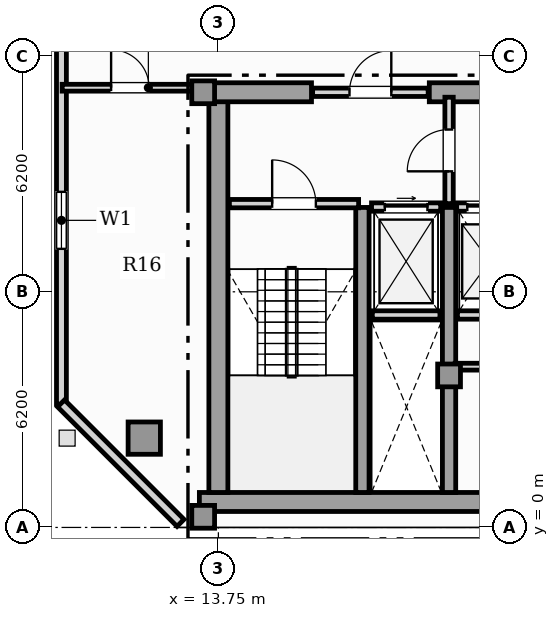
"""IFC4 building model, lengths in metres.
Left out: names, types, materials, properties, quantities, classifications, styles, units other than length and angle.
Written with IfcOpenShell. Run it as: python <this file> out.ifc"""

import sys

from ifc_helpers import new_model, si_unit, direction, frame, frame_2d, origin, origin_2d, place, context, subcontext, project, spatial, rectangle, hollow_rectangle, extrude, element, fill, save


model = new_model("IFC4")
c1 = context("Model", 3, precision=1e-05, world=origin(), true_north=direction((0.0, 1.0)))
c2 = subcontext(c1, "Body", "Model", "MODEL_VIEW")
j1 = project(units=[si_unit("LENGTHUNIT", "METRE"), si_unit("PLANEANGLEUNIT", "RADIAN")], contexts=[c1])
p1 = place(None, origin())
s1 = spatial("IfcSite", under=j1, at=p1, CompositionType="ELEMENT")
p2 = place(p1, origin())
s2 = spatial("IfcBuilding", under=s1, at=p2, CompositionType="ELEMENT")
p3 = place(p2, frame((0.0, 0.0, 345.2)))
s3 = spatial("IfcBuildingStorey", under=s2, at=p3, CompositionType="ELEMENT", Elevation=345.2)
p4 = place(p3, frame((13.25, 0.67, 0.0), z_axis=(0.0, 0.0, 1.0), x_axis=(1.0, 0.0, 0.0)))
e1 = element("IfcWall", 1, at=p4, inside=s3, PredefinedType="SHEAR", context=c2, shape_type="SweptSolid", body=[
    extrude(rectangle(XDim=31.0, YDim=0.5, at=frame_2d((15.5, 0.0))), origin(), (0.0, 0.0, 1.0), 3.59),
])
p5 = place(p3, frame((13.75, 0.92, 0.0), z_axis=(0.0, 0.0, 1.0), x_axis=(0.0, 1.0, 0.0)))
e2 = element("IfcWall", 2, at=p5, inside=s3, PredefinedType="SHEAR", context=c2, shape_type="SweptSolid", body=[
    extrude(rectangle(XDim=10.53, YDim=0.5, at=frame_2d((5.265, 0.0))), origin(), (0.0, 0.0, 1.0), 3.59),
])
p6 = place(p3, frame((13.25, 11.45, 0.0), z_axis=(0.0, 0.0, 1.0), x_axis=(1.0, 0.0, 0.0)))
e3 = element("IfcWall", 3, at=p6, inside=s3, PredefinedType="SHEAR", context=c2, shape_type="SweptSolid", body=[
    extrude(rectangle(XDim=2.95, YDim=0.5, at=frame_2d((1.475, 0.0))), origin(), (0.0, 0.0, 1.0), 3.59),
])
p7 = place(p3, frame((19.3, 11.45, 0.0), z_axis=(0.0, 0.0, 1.0), x_axis=(1.0, 0.0, 0.0)))
e4 = element("IfcWall", 4, at=p7, inside=s3, PredefinedType="SHEAR", context=c2, shape_type="SweptSolid", body=[
    extrude(rectangle(XDim=7.3, YDim=0.5, at=frame_2d((3.65, 0.0))), origin(), (0.0, 0.0, 1.0), 3.59),
])
for number, where, z_axis, x_axis in (
    (5, (17.54, 0.92, 0.0), (0.0, 0.0, 1.0), (0.0, 1.0, 0.0)),
    (6, (19.82, 0.92, 0.0), (0.0, 0.0, 1.0), (0.0, 1.0, 0.0)),
):
    element("IfcWall", number, at=place(p3, frame(where, z_axis=z_axis, x_axis=x_axis)), inside=s3, PredefinedType="SHEAR", context=c2, shape_type="SweptSolid", body=[
        extrude(rectangle(XDim=7.5, YDim=0.35, at=frame_2d((3.75, 0.0))), origin(), (0.0, 0.0, 1.0), 3.59),
    ])
for number, where, z_axis, x_axis in (
    (7, (13.35, 0.28, 0.0), (0.0, 0.0, 1.0), (1.0, 0.0, 0.0)),
    (8, (13.35, 11.45, 0.0), (0.0, 0.0, 1.0), (1.0, 0.0, 0.0)),
    (9, (19.82, 4.0, 0.0), (0.0, 0.0, 1.0), (1.0, 0.0, 0.0)),
):
    element("IfcColumn", number, at=place(p3, frame(where, z_axis=z_axis, x_axis=x_axis)), inside=s3, PredefinedType="COLUMN", context=c2, shape_type="SweptSolid", body=[
        extrude(rectangle(XDim=0.6, YDim=0.6, at=origin_2d()), origin(), (0.0, 0.0, 1.0), 3.85),
    ])
p8 = place(p3, frame((11.8, 2.35, 0.0), z_axis=(0.0, 0.0, 1.0), x_axis=(1.0, 0.0, 0.0)))
e10 = element("IfcColumn", 10, at=p8, inside=s3, PredefinedType="USERDEFINED", context=c2, shape_type="SweptSolid", body=[
    extrude(hollow_rectangle(XDim=0.85, YDim=0.85, WallThickness=0.05, at=origin_2d()), origin(), (0.0, 0.0, 1.0), 3.85),
])
p9 = place(p3, frame((9.621, 28.202, 0.0), z_axis=(0.0, 0.0, 1.0), x_axis=(0.0, -1.0, 0.0)))
e11 = element("IfcWall", 11, at=p9, inside=s3, PredefinedType="SOLIDWALL", context=c2, shape_type="SweptSolid", body=[
    extrude(rectangle(XDim=24.962, YDim=0.26, at=frame_2d((12.481, 0.0))), origin(), (0.0, 0.0, 1.0), 3.59),
])
p10 = place(p9, frame((19.372, 0.0, 0.9)))
e12 = element("IfcOpeningElement", 12, at=p10, cuts=e11, PredefinedType="OPENING", context=c2, shape_type="SweptSolid", body=[
    extrude(rectangle(XDim=1.5, YDim=1.95, at=frame_2d((0.75, 0.975))), frame((0.0, 0.14, 0.0), z_axis=(0.0, -1.0, 0.0), x_axis=(1.0, 0.0, 0.0)), (0.0, 0.0, 1.0), 0.28),
])
p11 = place(p9, frame((2.77, 0.0, 0.95)))
e13 = element("IfcOpeningElement", 13, at=p11, cuts=e11, PredefinedType="OPENING", context=c2, shape_type="SweptSolid", body=[
    extrude(rectangle(XDim=0.9, YDim=1.5, at=frame_2d((0.45, 0.75))), frame((0.0, 0.14, 0.0), z_axis=(0.0, -1.0, 0.0), x_axis=(1.0, 0.0, 0.0)), (0.0, 0.0, 1.0), 0.28),
])
p12 = place(p9, frame((7.989, 0.0, 0.9)))
e14 = element("IfcOpeningElement", 14, at=p12, cuts=e11, PredefinedType="OPENING", context=c2, shape_type="SweptSolid", body=[
    extrude(rectangle(XDim=1.5, YDim=1.95, at=frame_2d((0.75, 0.975))), frame((0.0, 0.14, 0.0), z_axis=(0.0, -1.0, 0.0), x_axis=(1.0, 0.0, 0.0)), (0.0, 0.0, 1.0), 0.28),
])
p13 = place(p3, frame((9.611, 3.264, 0.0), z_axis=(0.0, 0.0, 1.0), x_axis=(0.707079321262, -0.707134240044, 0.0)))
e15 = element("IfcWall", 15, at=p13, inside=s3, PredefinedType="SOLIDWALL", context=c2, shape_type="SweptSolid", body=[
    extrude(rectangle(XDim=4.446, YDim=0.26, at=frame_2d((2.223, 0.0))), origin(), (0.0, 0.0, 1.0), 3.59),
])
p14 = place(p3, frame((17.8, 5.59, 0.0), z_axis=(0.0, 0.0, 1.0), x_axis=(1.0, 0.0, 0.0)))
e16 = element("IfcWall", 16, at=p14, inside=s3, PredefinedType="SOLIDWALL", context=c2, shape_type="SweptSolid", body=[
    extrude(rectangle(XDim=1.78, YDim=0.22, at=frame_2d((0.89, 0.0))), origin(), (0.0, 0.0, 1.0), 3.59),
])
p15 = place(p3, frame((17.78, 8.43, 0.0), z_axis=(0.0, 0.0, 1.0), x_axis=(1.0, 0.0, 0.0)))
e17 = element("IfcWall", 17, at=p15, inside=s3, PredefinedType="SOLIDWALL", context=c2, shape_type="SweptSolid", body=[
    extrude(rectangle(XDim=1.82, YDim=0.22, at=frame_2d((0.91, 0.0))), origin(), (0.0, 0.0, 1.0), 3.59),
])
p16 = place(p15, frame((0.35, 0.0, 0.0)))
e18 = element("IfcOpeningElement", 18, at=p16, cuts=e17, PredefinedType="OPENING", context=c2, shape_type="SweptSolid", body=[
    extrude(rectangle(XDim=1.12, YDim=2.25, at=frame_2d((0.56, 1.125))), frame((0.0, 0.12, 0.0), z_axis=(0.0, -1.0, 0.0), x_axis=(1.0, 0.0, 0.0)), (0.0, 0.0, 1.0), 0.24),
])
p17 = place(p3, frame((20.04, 5.59, 0.0), z_axis=(0.0, 0.0, 1.0), x_axis=(1.0, 0.0, 0.0)))
e19 = element("IfcWall", 19, at=p17, inside=s3, PredefinedType="SOLIDWALL", context=c2, shape_type="SweptSolid", body=[
    extrude(rectangle(XDim=1.7, YDim=0.22, at=frame_2d((0.85, 0.0))), origin(), (0.0, 0.0, 1.0), 3.59),
])
p18 = place(p3, frame((20.02, 8.43, 0.0), z_axis=(0.0, 0.0, 1.0), x_axis=(1.0, 0.0, 0.0)))
e20 = element("IfcWall", 20, at=p18, inside=s3, PredefinedType="SOLIDWALL", context=c2, shape_type="SweptSolid", body=[
    extrude(rectangle(XDim=1.74, YDim=0.22, at=frame_2d((0.87, 0.0))), origin(), (0.0, 0.0, 1.0), 3.59),
])
p19 = place(p18, frame((0.28, 0.0, 0.0)))
e21 = element("IfcOpeningElement", 21, at=p19, cuts=e20, PredefinedType="OPENING", context=c2, shape_type="SweptSolid", body=[
    extrude(rectangle(XDim=1.18, YDim=2.2, at=frame_2d((0.59, 1.1))), frame((0.0, 0.12, 0.0), z_axis=(0.0, -1.0, 0.0), x_axis=(1.0, 0.0, 0.0)), (0.0, 0.0, 1.0), 0.24),
])
p20 = place(p3, frame((14.04, 8.52, 0.0), z_axis=(0.0, 0.0, 1.0), x_axis=(1.0, 0.0, 0.0)))
e22 = element("IfcWall", 22, at=p20, inside=s3, PredefinedType="SOLIDWALL", context=c2, shape_type="SweptSolid", body=[
    extrude(rectangle(XDim=3.4, YDim=0.22, at=frame_2d((1.7, 0.0))), origin(), (0.0, 0.0, 1.0), 3.59),
])
p21 = place(p20, frame((1.125, 0.0, 0.0)))
e23 = element("IfcOpeningElement", 23, at=p21, cuts=e22, PredefinedType="OPENING", context=c2, shape_type="SweptSolid", body=[
    extrude(rectangle(XDim=1.15, YDim=2.2, at=frame_2d((0.575, 1.1))), frame((0.0, 0.12, 0.0), z_axis=(0.0, -1.0, 0.0), x_axis=(1.0, 0.0, 0.0)), (0.0, 0.0, 1.0), 0.24),
])
p22 = place(p3, frame((19.82, 8.52, 0.0), z_axis=(0.0, 0.0, 1.0), x_axis=(0.0, 1.0, 0.0)))
e24 = element("IfcWall", 24, at=p22, inside=s3, PredefinedType="SOLIDWALL", context=c2, shape_type="SweptSolid", body=[
    extrude(rectangle(XDim=2.8, YDim=0.22, at=frame_2d((1.4, 0.0))), origin(), (0.0, 0.0, 1.0), 3.046),
])
p23 = place(p22, frame((0.85, 0.0, 0.0)))
e25 = element("IfcOpeningElement", 25, at=p23, cuts=e24, PredefinedType="OPENING", context=c2, shape_type="SweptSolid", body=[
    extrude(rectangle(XDim=1.1, YDim=2.2, at=frame_2d((0.55, 1.1))), frame((0.0, 0.12, 0.0), z_axis=(0.0, -1.0, 0.0), x_axis=(1.0, 0.0, 0.0)), (0.0, 0.0, 1.0), 0.24),
])
p24 = place(p3, frame((16.23, 11.45, 0.0), z_axis=(0.0, 0.0, 1.0), x_axis=(1.0, 0.0, 0.0)))
e26 = element("IfcWall", 26, at=p24, inside=s3, PredefinedType="SOLIDWALL", context=c2, shape_type="SweptSolid", body=[
    extrude(rectangle(XDim=3.04, YDim=0.22, at=frame_2d((1.52, 0.0))), origin(), (0.0, 0.0, 1.0), 3.59),
])
p25 = place(p24, frame((0.97, 0.0, 0.0)))
e27 = element("IfcOpeningElement", 27, at=p25, cuts=e26, PredefinedType="OPENING", context=c2, shape_type="SweptSolid", body=[
    extrude(rectangle(XDim=1.1, YDim=2.2, at=frame_2d((0.55, 1.1))), frame((0.0, 0.12, 0.0), z_axis=(0.0, -1.0, 0.0), x_axis=(1.0, 0.0, 0.0)), (0.0, 0.0, 1.0), 0.24),
])
p26 = place(p3, frame((19.98, 4.23, 0.0), z_axis=(0.0, 0.0, 1.0), x_axis=(1.0, 0.0, 0.0)))
e28 = element("IfcWall", 28, at=p26, inside=s3, PredefinedType="PARTITIONING", context=c2, shape_type="SweptSolid", body=[
    extrude(rectangle(XDim=5.32, YDim=0.18, at=frame_2d((2.66, 0.0))), origin(), (0.0, 0.0, 1.0), 3.59),
])
p27 = place(p3, frame((9.64, 11.57, 0.0), z_axis=(0.0, 0.0, 1.0), x_axis=(1.0, 0.0, 0.0)))
e29 = element("IfcWall", 29, at=p27, inside=s3, PredefinedType="PARTITIONING", context=c2, shape_type="SweptSolid", body=[
    extrude(rectangle(XDim=3.575, YDim=0.18, at=frame_2d((1.788, 0.0))), origin(), (0.0, 0.0, 1.0), 3.59),
])
p28 = place(p27, frame((1.287, 0.0, 0.0)))
e30 = element("IfcOpeningElement", 30, at=p28, cuts=e29, PredefinedType="OPENING", context=c2, shape_type="SweptSolid", body=[
    extrude(rectangle(XDim=1.0, YDim=2.15, at=frame_2d((0.5, 1.075))), frame((0.0, 0.1, 0.0), z_axis=(0.0, -1.0, 0.0), x_axis=(1.0, 0.0, 0.0)), (0.0, 0.0, 1.0), 0.2),
])
p29 = place(p10, origin())
e31 = element("IfcWindow", 31, at=p29, inside=s3, PartitioningType="SINGLE_PANEL", PredefinedType="WINDOW", context=c2, shape_type="SweptSolid", body=[
    extrude(rectangle(XDim=1.5, YDim=1.95, at=frame_2d((0.75, 0.975))), frame((0.0, 0.03, 0.0), z_axis=(0.0, -1.0, 0.0), x_axis=(1.0, 0.0, 0.0)), (0.0, 0.0, 1.0), 0.06),
])
fill(e12, e31)
p30 = place(p16, origin())
e32 = element("IfcDoor", 32, at=p30, inside=s3, OperationType="SLIDING_TO_RIGHT", PredefinedType="DOOR", context=c2, shape_type="SweptSolid", body=[
    extrude(rectangle(XDim=1.12, YDim=2.25, at=frame_2d((0.56, 1.125))), frame((0.0, 0.025, 0.0), z_axis=(0.0, -1.0, 0.0), x_axis=(1.0, 0.0, 0.0)), (0.0, 0.0, 1.0), 0.05),
])
fill(e18, e32)
p31 = place(p19, origin())
e33 = element("IfcDoor", 33, at=p31, inside=s3, OperationType="SLIDING_TO_LEFT", PredefinedType="DOOR", context=c2, shape_type="SweptSolid", body=[
    extrude(rectangle(XDim=1.18, YDim=2.2, at=frame_2d((0.59, 1.1))), frame((0.0, 0.025, 0.0), z_axis=(0.0, -1.0, 0.0), x_axis=(1.0, 0.0, 0.0)), (0.0, 0.0, 1.0), 0.05),
])
fill(e21, e33)
p32 = place(p21, origin())
e34 = element("IfcDoor", 34, at=p32, inside=s3, OperationType="SINGLE_SWING_LEFT", PredefinedType="DOOR", context=c2, shape_type="SweptSolid", body=[
    extrude(rectangle(XDim=1.15, YDim=2.2, at=frame_2d((0.575, 1.1))), frame((0.0, 0.025, 0.0), z_axis=(0.0, -1.0, 0.0), x_axis=(1.0, 0.0, 0.0)), (0.0, 0.0, 1.0), 0.05),
])
fill(e23, e34)
p33 = place(p23, origin())
e35 = element("IfcDoor", 35, at=p33, inside=s3, OperationType="SINGLE_SWING_LEFT", PredefinedType="DOOR", context=c2, shape_type="SweptSolid", body=[
    extrude(rectangle(XDim=1.1, YDim=2.2, at=frame_2d((0.55, 1.1))), frame((0.0, 0.025, 0.0), z_axis=(0.0, -1.0, 0.0), x_axis=(1.0, 0.0, 0.0)), (0.0, 0.0, 1.0), 0.05),
])
fill(e25, e35)
p34 = place(p25, origin())
e36 = element("IfcDoor", 36, at=p34, inside=s3, OperationType="SINGLE_SWING_RIGHT", PredefinedType="DOOR", context=c2, shape_type="SweptSolid", body=[
    extrude(rectangle(XDim=1.1, YDim=2.2, at=frame_2d((0.55, 1.1))), frame((0.0, 0.025, 0.0), z_axis=(0.0, -1.0, 0.0), x_axis=(1.0, 0.0, 0.0)), (0.0, 0.0, 1.0), 0.05),
])
fill(e27, e36)
p35 = place(p28, origin())
e37 = element("IfcDoor", 37, at=p35, inside=s3, OperationType="SINGLE_SWING_LEFT", PredefinedType="DOOR", context=c2, shape_type="SweptSolid", body=[
    extrude(rectangle(XDim=1.0, YDim=2.15, at=frame_2d((0.5, 1.075))), frame((0.0, 0.025, 0.0), z_axis=(0.0, -1.0, 0.0), x_axis=(1.0, 0.0, 0.0)), (0.0, 0.0, 1.0), 0.05),
])
fill(e30, e37)
save(model, sys.argv[1])
